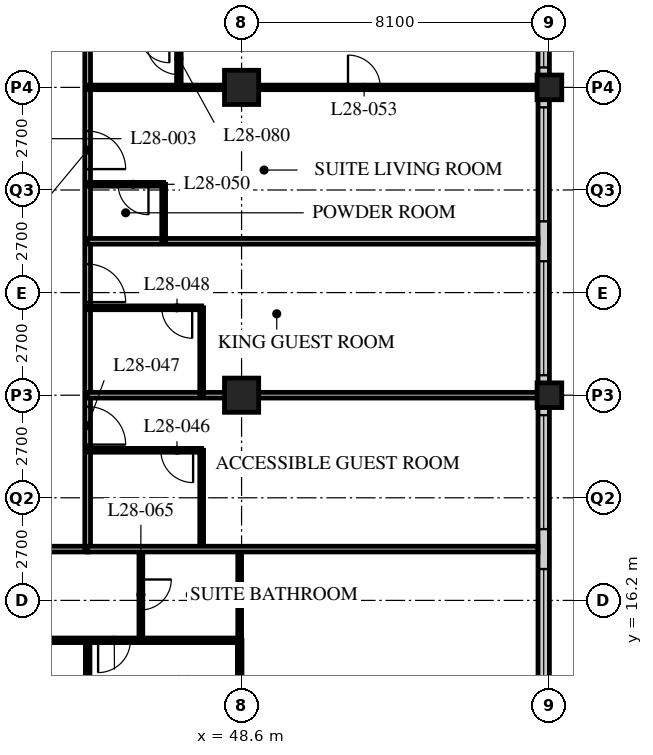
"""IFC4 building model, lengths in metres.
Left out: names, types, materials, properties, quantities, classifications, styles, units other than length and angle.
Written with IfcOpenShell. Run it as: python <this file> out.ifc"""

import sys

from ifc_helpers import new_model, si_unit, direction, frame, frame_2d, origin, origin_2d, place, context, subcontext, project, spatial, rectangle, hollow_rectangle, extrude, element, fill, save


model = new_model("IFC4")
c1 = context("Model", 3, precision=1e-05, world=origin(), true_north=direction((0.0, 1.0)))
c2 = subcontext(c1, "Body", "Model", "MODEL_VIEW")
j1 = project(units=[si_unit("LENGTHUNIT", "METRE"), si_unit("PLANEANGLEUNIT", "RADIAN")], contexts=[c1])
p1 = place(None, origin())
s1 = spatial("IfcSite", under=j1, at=p1, CompositionType="ELEMENT")
p2 = place(p1, origin())
s2 = spatial("IfcBuilding", under=s1, at=p2, CompositionType="ELEMENT")
p3 = place(p2, frame((0.0, 0.0, 113.6)))
s3 = spatial("IfcBuildingStorey", under=s2, at=p3, CompositionType="ELEMENT", Elevation=113.6)
for number, where, z_axis, x_axis in (
    (1, (48.6, 21.6, 0.0), (0.0, 0.0, 1.0), (1.0, 0.0, 0.0)),
    (2, (48.6, 29.7, 0.0), (0.0, 0.0, 1.0), (1.0, 0.0, 0.0)),
):
    element("IfcColumn", number, at=place(p3, frame(where, z_axis=z_axis, x_axis=x_axis)), inside=s3, PredefinedType="COLUMN", context=c2, shape_type="SweptSolid", body=[
        extrude(hollow_rectangle(XDim=0.9, YDim=0.9, WallThickness=0.09, at=origin_2d()), origin(), (0.0, 0.0, 1.0), 3.4),
    ])
for number, where, z_axis, x_axis in (
    (3, (56.7, 21.6, 0.0), (0.0, 0.0, 1.0), (1.0, 0.0, 0.0)),
    (4, (56.7, 29.7, 0.0), (0.0, 0.0, 1.0), (1.0, 0.0, 0.0)),
):
    element("IfcColumn", number, at=place(p3, frame(where, z_axis=z_axis, x_axis=x_axis)), inside=s3, PredefinedType="COLUMN", context=c2, shape_type="SweptSolid", body=[
        extrude(hollow_rectangle(XDim=0.65, YDim=0.65, WallThickness=0.055, at=origin_2d()), origin(), (0.0, 0.0, 1.0), 3.4),
    ])
p4 = place(p3, frame((56.55, 13.8, 0.0), z_axis=(0.0, 0.0, 1.0), x_axis=(0.0, 1.0, 0.0)))
e5 = element("IfcWall", 5, at=p4, inside=s3, PredefinedType="SOLIDWALL", context=c2, shape_type="SweptSolid", body=[
    extrude(rectangle(XDim=32.1, YDim=0.3, at=frame_2d((16.05, 0.0))), origin(), (0.0, 0.0, 1.0), 3.19),
])
p5 = place(p4, frame((0.225, 0.0, 0.9)))
e6 = element("IfcOpeningElement", 6, at=p5, cuts=e5, PredefinedType="OPENING", context=c2, shape_type="SweptSolid", body=[
    extrude(rectangle(XDim=3.0, YDim=2.0, at=frame_2d((1.5, 1.0))), frame((0.0, 0.16, 0.0), z_axis=(0.0, -1.0, 0.0), x_axis=(1.0, 0.0, 0.0)), (0.0, 0.0, 1.0), 0.32),
])
p6 = place(p4, frame((4.275, 0.0, 0.9)))
e7 = element("IfcOpeningElement", 7, at=p6, cuts=e5, PredefinedType="OPENING", context=c2, shape_type="SweptSolid", body=[
    extrude(rectangle(XDim=3.0, YDim=2.0, at=frame_2d((1.5, 1.0))), frame((0.0, 0.16, 0.0), z_axis=(0.0, -1.0, 0.0), x_axis=(1.0, 0.0, 0.0)), (0.0, 0.0, 1.0), 0.32),
])
p7 = place(p4, frame((8.325, 0.0, 0.9)))
e8 = element("IfcOpeningElement", 8, at=p7, cuts=e5, PredefinedType="OPENING", context=c2, shape_type="SweptSolid", body=[
    extrude(rectangle(XDim=3.0, YDim=2.0, at=frame_2d((1.5, 1.0))), frame((0.0, 0.16, 0.0), z_axis=(0.0, -1.0, 0.0), x_axis=(1.0, 0.0, 0.0)), (0.0, 0.0, 1.0), 0.32),
])
p8 = place(p4, frame((12.375, 0.0, 0.9)))
e9 = element("IfcOpeningElement", 9, at=p8, cuts=e5, PredefinedType="OPENING", context=c2, shape_type="SweptSolid", body=[
    extrude(rectangle(XDim=3.0, YDim=2.0, at=frame_2d((1.5, 1.0))), frame((0.0, 0.16, 0.0), z_axis=(0.0, -1.0, 0.0), x_axis=(1.0, 0.0, 0.0)), (0.0, 0.0, 1.0), 0.32),
])
p9 = place(p4, frame((16.425, 0.0, 0.9)))
e10 = element("IfcOpeningElement", 10, at=p9, cuts=e5, PredefinedType="OPENING", context=c2, shape_type="SweptSolid", body=[
    extrude(rectangle(XDim=3.0, YDim=2.0, at=frame_2d((1.5, 1.0))), frame((0.0, 0.16, 0.0), z_axis=(0.0, -1.0, 0.0), x_axis=(1.0, 0.0, 0.0)), (0.0, 0.0, 1.0), 0.32),
])
p10 = place(p4, frame((20.475, 0.0, 0.9)))
e11 = element("IfcOpeningElement", 11, at=p10, cuts=e5, PredefinedType="OPENING", context=c2, shape_type="SweptSolid", body=[
    extrude(rectangle(XDim=3.0, YDim=2.0, at=frame_2d((1.5, 1.0))), frame((0.0, 0.16, 0.0), z_axis=(0.0, -1.0, 0.0), x_axis=(1.0, 0.0, 0.0)), (0.0, 0.0, 1.0), 0.32),
])
p11 = place(p4, frame((24.525, 0.0, 0.9)))
e12 = element("IfcOpeningElement", 12, at=p11, cuts=e5, PredefinedType="OPENING", context=c2, shape_type="SweptSolid", body=[
    extrude(rectangle(XDim=3.0, YDim=2.0, at=frame_2d((1.5, 1.0))), frame((0.0, 0.16, 0.0), z_axis=(0.0, -1.0, 0.0), x_axis=(1.0, 0.0, 0.0)), (0.0, 0.0, 1.0), 0.32),
])
p12 = place(p4, frame((28.575, 0.0, 0.9)))
e13 = element("IfcOpeningElement", 13, at=p12, cuts=e5, PredefinedType="OPENING", context=c2, shape_type="SweptSolid", body=[
    extrude(rectangle(XDim=3.0, YDim=2.0, at=frame_2d((1.5, 1.0))), frame((0.0, 0.16, 0.0), z_axis=(0.0, -1.0, 0.0), x_axis=(1.0, 0.0, 0.0)), (0.0, 0.0, 1.0), 0.32),
])
p13 = place(p3, frame((12.15, 17.55, 0.0), z_axis=(0.0, 0.0, 1.0), x_axis=(1.0, 0.0, 0.0)))
e14 = element("IfcWall", 14, at=p13, inside=s3, PredefinedType="PARTITIONING", context=c2, shape_type="SweptSolid", body=[
    extrude(rectangle(XDim=32.4, YDim=0.15, at=frame_2d((16.2, 0.0))), origin(), (0.0, 0.0, 1.0), 3.19),
])
p14 = place(p13, frame((5.95, 0.0, 0.0)))
e15 = element("IfcOpeningElement", 15, at=p14, cuts=e14, PredefinedType="OPENING", context=c2, shape_type="SweptSolid", body=[
    extrude(rectangle(XDim=1.0, YDim=2.1, at=frame_2d((0.5, 1.05))), frame((0.0, 0.085, 0.0), z_axis=(0.0, -1.0, 0.0), x_axis=(1.0, 0.0, 0.0)), (0.0, 0.0, 1.0), 0.17),
])
p15 = place(p13, frame((17.725, 0.0, 0.0)))
e16 = element("IfcOpeningElement", 16, at=p15, cuts=e14, PredefinedType="OPENING", context=c2, shape_type="SweptSolid", body=[
    extrude(rectangle(XDim=1.0, YDim=2.1, at=frame_2d((0.5, 1.05))), frame((0.0, 0.085, 0.0), z_axis=(0.0, -1.0, 0.0), x_axis=(1.0, 0.0, 0.0)), (0.0, 0.0, 1.0), 0.17),
])
p16 = place(p13, frame((26.75, 0.0, 0.0)))
e17 = element("IfcOpeningElement", 17, at=p16, cuts=e14, PredefinedType="OPENING", context=c2, shape_type="SweptSolid", body=[
    extrude(rectangle(XDim=1.0, YDim=2.1, at=frame_2d((0.5, 1.05))), frame((0.0, 0.085, 0.0), z_axis=(0.0, -1.0, 0.0), x_axis=(1.0, 0.0, 0.0)), (0.0, 0.0, 1.0), 0.17),
])
p17 = place(p13, frame((1.525, 0.0, 0.0)))
e18 = element("IfcOpeningElement", 18, at=p17, cuts=e14, PredefinedType="OPENING", context=c2, shape_type="SweptSolid", body=[
    extrude(rectangle(XDim=1.0, YDim=2.1, at=frame_2d((0.5, 1.05))), frame((0.0, 0.085, 0.0), z_axis=(0.0, -1.0, 0.0), x_axis=(1.0, 0.0, 0.0)), (0.0, 0.0, 1.0), 0.17),
])
p18 = place(p13, frame((29.875, 0.0, 0.0)))
e19 = element("IfcOpeningElement", 19, at=p18, cuts=e14, PredefinedType="OPENING", context=c2, shape_type="SweptSolid", body=[
    extrude(rectangle(XDim=1.0, YDim=2.1, at=frame_2d((0.5, 1.05))), frame((0.0, 0.085, 0.0), z_axis=(0.0, -1.0, 0.0), x_axis=(1.0, 0.0, 0.0)), (0.0, 0.0, 1.0), 0.17),
])
p19 = place(p3, frame((44.55, 17.55, 0.0), z_axis=(0.0, 0.0, 1.0), x_axis=(0.0, 1.0, 0.0)))
e20 = element("IfcWall", 20, at=p19, inside=s3, PredefinedType="PARTITIONING", context=c2, shape_type="SweptSolid", body=[
    extrude(rectangle(XDim=28.35, YDim=0.15, at=frame_2d((14.175, 0.0))), origin(), (0.0, 0.0, 1.0), 3.19),
])
p20 = place(p19, frame((2.75, 0.0, 0.0)))
e21 = element("IfcOpeningElement", 21, at=p20, cuts=e20, PredefinedType="OPENING", context=c2, shape_type="SweptSolid", body=[
    extrude(rectangle(XDim=1.0, YDim=2.1, at=frame_2d((0.5, 1.05))), frame((0.0, 0.085, 0.0), z_axis=(0.0, -1.0, 0.0), x_axis=(1.0, 0.0, 0.0)), (0.0, 0.0, 1.0), 0.17),
])
p21 = place(p19, frame((6.5, 0.0, 0.0)))
e22 = element("IfcOpeningElement", 22, at=p21, cuts=e20, PredefinedType="OPENING", context=c2, shape_type="SweptSolid", body=[
    extrude(rectangle(XDim=1.0, YDim=2.1, at=frame_2d((0.5, 1.05))), frame((0.0, 0.085, 0.0), z_axis=(0.0, -1.0, 0.0), x_axis=(1.0, 0.0, 0.0)), (0.0, 0.0, 1.0), 0.17),
])
p22 = place(p19, frame((10.0, 0.0, 0.0)))
e23 = element("IfcOpeningElement", 23, at=p22, cuts=e20, PredefinedType="OPENING", context=c2, shape_type="SweptSolid", body=[
    extrude(rectangle(XDim=1.0, YDim=2.1, at=frame_2d((0.5, 1.05))), frame((0.0, 0.085, 0.0), z_axis=(0.0, -1.0, 0.0), x_axis=(1.0, 0.0, 0.0)), (0.0, 0.0, 1.0), 0.17),
])
p23 = place(p19, frame((21.65, 0.0, 0.0)))
e24 = element("IfcOpeningElement", 24, at=p23, cuts=e20, PredefinedType="OPENING", context=c2, shape_type="SweptSolid", body=[
    extrude(rectangle(XDim=1.0, YDim=2.1, at=frame_2d((0.5, 1.05))), frame((0.0, 0.085, 0.0), z_axis=(0.0, -1.0, 0.0), x_axis=(1.0, 0.0, 0.0)), (0.0, 0.0, 1.0), 0.17),
])
p24 = place(p19, frame((26.75, 0.0, 0.0)))
e25 = element("IfcOpeningElement", 25, at=p24, cuts=e20, PredefinedType="OPENING", context=c2, shape_type="SweptSolid", body=[
    extrude(rectangle(XDim=1.0, YDim=2.1, at=frame_2d((0.5, 1.05))), frame((0.0, 0.085, 0.0), z_axis=(0.0, -1.0, 0.0), x_axis=(1.0, 0.0, 0.0)), (0.0, 0.0, 1.0), 0.17),
])
p25 = place(p3, frame((47.55, 17.55, 0.0), z_axis=(0.0, 0.0, 1.0), x_axis=(0.0, 1.0, 0.0)))
e26 = element("IfcWall", 26, at=p25, inside=s3, PredefinedType="PARTITIONING", context=c2, shape_type="SweptSolid", body=[
    extrude(rectangle(XDim=2.6, YDim=0.1, at=frame_2d((1.3, 0.0))), origin(), (0.0, 0.0, 1.0), 3.19),
])
p26 = place(p3, frame((44.55, 20.15, 0.0), z_axis=(0.0, 0.0, 1.0), x_axis=(1.0, 0.0, 0.0)))
e27 = element("IfcWall", 27, at=p26, inside=s3, PredefinedType="PARTITIONING", context=c2, shape_type="SweptSolid", body=[
    extrude(rectangle(XDim=3.0, YDim=0.1, at=frame_2d((1.5, 0.0))), origin(), (0.0, 0.0, 1.0), 3.19),
])
p27 = place(p26, frame((1.925, 0.0, 0.0)))
e28 = element("IfcOpeningElement", 28, at=p27, cuts=e27, PredefinedType="OPENING", context=c2, shape_type="SweptSolid", body=[
    extrude(rectangle(XDim=0.85, YDim=2.1, at=frame_2d((0.425, 1.05))), frame((0.0, 0.06, 0.0), z_axis=(0.0, -1.0, 0.0), x_axis=(1.0, 0.0, 0.0)), (0.0, 0.0, 1.0), 0.12),
])
p28 = place(p3, frame((44.55, 21.6, 0.0), z_axis=(0.0, 0.0, 1.0), x_axis=(1.0, 0.0, 0.0)))
e29 = element("IfcWall", 29, at=p28, inside=s3, PredefinedType="PARTITIONING", context=c2, shape_type="SweptSolid", body=[
    extrude(rectangle(XDim=11.85, YDim=0.15, at=frame_2d((5.925, 0.0))), origin(), (0.0, 0.0, 1.0), 2.578),
])
p29 = place(p3, frame((47.55, 21.6, 0.0), z_axis=(0.0, 0.0, 1.0), x_axis=(0.0, 1.0, 0.0)))
e30 = element("IfcWall", 30, at=p29, inside=s3, PredefinedType="PARTITIONING", context=c2, shape_type="SweptSolid", body=[
    extrude(rectangle(XDim=2.3, YDim=0.1, at=frame_2d((1.15, 0.0))), origin(), (0.0, 0.0, 1.0), 3.19),
])
p30 = place(p3, frame((44.55, 23.9, 0.0), z_axis=(0.0, 0.0, 1.0), x_axis=(1.0, 0.0, 0.0)))
e31 = element("IfcWall", 31, at=p30, inside=s3, PredefinedType="PARTITIONING", context=c2, shape_type="SweptSolid", body=[
    extrude(rectangle(XDim=3.0, YDim=0.1, at=frame_2d((1.5, 0.0))), origin(), (0.0, 0.0, 1.0), 3.19),
])
p31 = place(p30, frame((1.95, 0.0, 0.0)))
e32 = element("IfcOpeningElement", 32, at=p31, cuts=e31, PredefinedType="OPENING", context=c2, shape_type="SweptSolid", body=[
    extrude(rectangle(XDim=0.8, YDim=2.1, at=frame_2d((0.4, 1.05))), frame((0.0, 0.06, 0.0), z_axis=(0.0, -1.0, 0.0), x_axis=(1.0, 0.0, 0.0)), (0.0, 0.0, 1.0), 0.12),
])
p32 = place(p3, frame((44.55, 25.65, 0.0), z_axis=(0.0, 0.0, 1.0), x_axis=(1.0, 0.0, 0.0)))
e33 = element("IfcWall", 33, at=p32, inside=s3, PredefinedType="PARTITIONING", context=c2, shape_type="SweptSolid", body=[
    extrude(rectangle(XDim=11.85, YDim=0.15, at=frame_2d((5.925, 0.0))), origin(), (0.0, 0.0, 1.0), 3.19),
])
p33 = place(p3, frame((46.55, 25.65, 0.0), z_axis=(0.0, 0.0, 1.0), x_axis=(0.0, 1.0, 0.0)))
e34 = element("IfcWall", 34, at=p33, inside=s3, PredefinedType="PARTITIONING", context=c2, shape_type="SweptSolid", body=[
    extrude(rectangle(XDim=1.5, YDim=0.1, at=frame_2d((0.75, 0.0))), origin(), (0.0, 0.0, 1.0), 3.19),
])
p34 = place(p3, frame((44.55, 27.15, 0.0), z_axis=(0.0, 0.0, 1.0), x_axis=(1.0, 0.0, 0.0)))
e35 = element("IfcWall", 35, at=p34, inside=s3, PredefinedType="PARTITIONING", context=c2, shape_type="SweptSolid", body=[
    extrude(rectangle(XDim=2.0, YDim=0.1, at=frame_2d((1.0, 0.0))), origin(), (0.0, 0.0, 1.0), 3.19),
])
p35 = place(p34, frame((0.8, 0.0, 0.0)))
e36 = element("IfcOpeningElement", 36, at=p35, cuts=e35, PredefinedType="OPENING", context=c2, shape_type="SweptSolid", body=[
    extrude(rectangle(XDim=0.8, YDim=2.1, at=frame_2d((0.4, 1.05))), frame((0.0, 0.06, 0.0), z_axis=(0.0, -1.0, 0.0), x_axis=(1.0, 0.0, 0.0)), (0.0, 0.0, 1.0), 0.12),
])
p36 = place(p3, frame((44.55, 29.7, 0.0), z_axis=(0.0, 0.0, 1.0), x_axis=(1.0, 0.0, 0.0)))
e37 = element("IfcWall", 37, at=p36, inside=s3, PredefinedType="PARTITIONING", context=c2, shape_type="SweptSolid", body=[
    extrude(rectangle(XDim=11.85, YDim=0.12, at=frame_2d((5.925, 0.0))), origin(), (0.0, 0.0, 1.0), 2.578),
])
p37 = place(p36, frame((6.85, 0.0, 0.0)))
e38 = element("IfcOpeningElement", 38, at=p37, cuts=e37, PredefinedType="OPENING", context=c2, shape_type="SweptSolid", body=[
    extrude(rectangle(XDim=0.85, YDim=2.1, at=frame_2d((0.425, 1.05))), frame((0.0, 0.07, 0.0), z_axis=(0.0, -1.0, 0.0), x_axis=(1.0, 0.0, 0.0)), (0.0, 0.0, 1.0), 0.14),
])
p38 = place(p3, frame((40.5, 15.15, 0.0), z_axis=(0.0, 0.0, 1.0), x_axis=(1.0, 0.0, 0.0)))
e39 = element("IfcWall", 39, at=p38, inside=s3, PredefinedType="PARTITIONING", context=c2, shape_type="SweptSolid", body=[
    extrude(rectangle(XDim=8.05, YDim=0.12, at=frame_2d((4.025, 0.0))), origin(), (0.0, 0.0, 1.0), 3.19),
])
p39 = place(p38, frame((0.475, 0.0, 0.0)))
e40 = element("IfcOpeningElement", 40, at=p39, cuts=e39, PredefinedType="OPENING", context=c2, shape_type="SweptSolid", body=[
    extrude(rectangle(XDim=0.85, YDim=2.1, at=frame_2d((0.425, 1.05))), frame((0.0, 0.07, 0.0), z_axis=(0.0, -1.0, 0.0), x_axis=(1.0, 0.0, 0.0)), (0.0, 0.0, 1.0), 0.14),
])
p40 = place(p38, frame((4.325, 0.0, 0.0)))
e41 = element("IfcOpeningElement", 41, at=p40, cuts=e39, PredefinedType="OPENING", context=c2, shape_type="SweptSolid", body=[
    extrude(rectangle(XDim=0.85, YDim=2.1, at=frame_2d((0.425, 1.05))), frame((0.0, 0.07, 0.0), z_axis=(0.0, -1.0, 0.0), x_axis=(1.0, 0.0, 0.0)), (0.0, 0.0, 1.0), 0.14),
])
p41 = place(p3, frame((45.95, 17.55, 0.0), z_axis=(0.0, 0.0, 1.0), x_axis=(0.0, -1.0, 0.0)))
e42 = element("IfcWall", 42, at=p41, inside=s3, PredefinedType="PARTITIONING", context=c2, shape_type="SweptSolid", body=[
    extrude(rectangle(XDim=2.4, YDim=0.1, at=frame_2d((1.2, 0.0))), origin(), (0.0, 0.0, 1.0), 3.19),
])
p42 = place(p41, frame((0.8, 0.0, 0.0)))
e43 = element("IfcOpeningElement", 43, at=p42, cuts=e42, PredefinedType="OPENING", context=c2, shape_type="SweptSolid", body=[
    extrude(rectangle(XDim=0.8, YDim=2.1, at=frame_2d((0.4, 1.05))), frame((0.0, 0.06, 0.0), z_axis=(0.0, -1.0, 0.0), x_axis=(1.0, 0.0, 0.0)), (0.0, 0.0, 1.0), 0.12),
])
p43 = place(p3, frame((48.55, 17.55, 0.0), z_axis=(0.0, 0.0, 1.0), x_axis=(0.0, -1.0, 0.0)))
e44 = element("IfcWall", 44, at=p43, inside=s3, PredefinedType="PARTITIONING", context=c2, shape_type="SweptSolid", body=[
    extrude(rectangle(XDim=2.4, YDim=0.1, at=frame_2d((1.2, 0.0))), origin(), (0.0, 0.0, 1.0), 2.578),
])
p44 = place(p3, frame((44.55, 15.15, 0.0), z_axis=(0.0, 0.0, 1.0), x_axis=(0.0, -1.0, 0.0)))
e45 = element("IfcWall", 45, at=p44, inside=s3, PredefinedType="PARTITIONING", context=c2, shape_type="SweptSolid", body=[
    extrude(rectangle(XDim=9.45, YDim=0.12, at=frame_2d((4.725, 0.0))), origin(), (0.0, 0.0, 1.0), 3.19),
])
p45 = place(p3, frame((44.55, 17.55, 0.0), z_axis=(0.0, 0.0, 1.0), x_axis=(1.0, 0.0, 0.0)))
e46 = element("IfcWall", 46, at=p45, inside=s3, PredefinedType="PARTITIONING", context=c2, shape_type="SweptSolid", body=[
    extrude(rectangle(XDim=11.85, YDim=0.15, at=frame_2d((5.925, 0.0))), origin(), (0.0, 0.0, 1.0), 3.19),
])
p46 = place(p3, frame((46.95, 31.16, 0.0), z_axis=(0.0, 0.0, 1.0), x_axis=(0.0, -1.0, 0.0)))
e47 = element("IfcWall", 47, at=p46, inside=s3, PredefinedType="PARTITIONING", context=c2, shape_type="SweptSolid", body=[
    extrude(rectangle(XDim=1.46, YDim=0.12, at=frame_2d((0.73, 0.0))), origin(), (0.0, 0.0, 1.0), 3.19),
])
p47 = place(p46, frame((0.275, 0.0, 0.0)))
e48 = element("IfcOpeningElement", 48, at=p47, cuts=e47, PredefinedType="OPENING", context=c2, shape_type="SweptSolid", body=[
    extrude(rectangle(XDim=0.85, YDim=2.1, at=frame_2d((0.425, 1.05))), frame((0.0, 0.07, 0.0), z_axis=(0.0, -1.0, 0.0), x_axis=(1.0, 0.0, 0.0)), (0.0, 0.0, 1.0), 0.14),
])
p48 = place(p3, frame((48.55, 15.15, 0.0), z_axis=(0.0, 0.0, 1.0), x_axis=(0.0, -1.0, 0.0)))
e49 = element("IfcWall", 49, at=p48, inside=s3, PredefinedType="PARTITIONING", context=c2, shape_type="SweptSolid", body=[
    extrude(rectangle(XDim=1.2, YDim=0.12, at=frame_2d((0.6, 0.0))), origin(), (0.0, 0.0, 1.0), 2.578),
])
p49 = place(p5, origin())
e50 = element("IfcWindow", 50, at=p49, inside=s3, PartitioningType="SINGLE_PANEL", PredefinedType="WINDOW", context=c2, shape_type="SweptSolid", body=[
    extrude(rectangle(XDim=3.0, YDim=2.0, at=frame_2d((1.5, 1.0))), frame((0.0, 0.03, 0.0), z_axis=(0.0, -1.0, 0.0), x_axis=(1.0, 0.0, 0.0)), (0.0, 0.0, 1.0), 0.06),
])
fill(e6, e50)
p50 = place(p6, origin())
e51 = element("IfcWindow", 51, at=p50, inside=s3, PartitioningType="SINGLE_PANEL", PredefinedType="WINDOW", context=c2, shape_type="SweptSolid", body=[
    extrude(rectangle(XDim=3.0, YDim=2.0, at=frame_2d((1.5, 1.0))), frame((0.0, 0.03, 0.0), z_axis=(0.0, -1.0, 0.0), x_axis=(1.0, 0.0, 0.0)), (0.0, 0.0, 1.0), 0.06),
])
fill(e7, e51)
p51 = place(p7, origin())
e52 = element("IfcWindow", 52, at=p51, inside=s3, PartitioningType="SINGLE_PANEL", PredefinedType="WINDOW", context=c2, shape_type="SweptSolid", body=[
    extrude(rectangle(XDim=3.0, YDim=2.0, at=frame_2d((1.5, 1.0))), frame((0.0, 0.03, 0.0), z_axis=(0.0, -1.0, 0.0), x_axis=(1.0, 0.0, 0.0)), (0.0, 0.0, 1.0), 0.06),
])
fill(e8, e52)
p52 = place(p8, origin())
e53 = element("IfcWindow", 53, at=p52, inside=s3, PartitioningType="SINGLE_PANEL", PredefinedType="WINDOW", context=c2, shape_type="SweptSolid", body=[
    extrude(rectangle(XDim=3.0, YDim=2.0, at=frame_2d((1.5, 1.0))), frame((0.0, 0.03, 0.0), z_axis=(0.0, -1.0, 0.0), x_axis=(1.0, 0.0, 0.0)), (0.0, 0.0, 1.0), 0.06),
])
fill(e9, e53)
p53 = place(p9, origin())
e54 = element("IfcWindow", 54, at=p53, inside=s3, PartitioningType="SINGLE_PANEL", PredefinedType="WINDOW", context=c2, shape_type="SweptSolid", body=[
    extrude(rectangle(XDim=3.0, YDim=2.0, at=frame_2d((1.5, 1.0))), frame((0.0, 0.03, 0.0), z_axis=(0.0, -1.0, 0.0), x_axis=(1.0, 0.0, 0.0)), (0.0, 0.0, 1.0), 0.06),
])
fill(e10, e54)
p54 = place(p27, origin())
e55 = element("IfcDoor", 55, at=p54, inside=s3, OperationType="SINGLE_SWING_LEFT", PredefinedType="DOOR", context=c2, shape_type="SweptSolid", body=[
    extrude(rectangle(XDim=0.85, YDim=2.1, at=frame_2d((0.425, 1.05))), frame((0.0, 0.025, 0.0), z_axis=(0.0, -1.0, 0.0), x_axis=(1.0, 0.0, 0.0)), (0.0, 0.0, 1.0), 0.05),
])
fill(e28, e55)
p55 = place(p20, origin())
e56 = element("IfcDoor", 56, at=p55, inside=s3, OperationType="SINGLE_SWING_RIGHT", PredefinedType="DOOR", context=c2, shape_type="SweptSolid", body=[
    extrude(rectangle(XDim=1.0, YDim=2.1, at=frame_2d((0.5, 1.05))), frame((0.0, 0.025, 0.0), z_axis=(0.0, -1.0, 0.0), x_axis=(1.0, 0.0, 0.0)), (0.0, 0.0, 1.0), 0.05),
])
fill(e21, e56)
p56 = place(p31, origin())
e57 = element("IfcDoor", 57, at=p56, inside=s3, OperationType="SINGLE_SWING_LEFT", PredefinedType="DOOR", context=c2, shape_type="SweptSolid", body=[
    extrude(rectangle(XDim=0.8, YDim=2.1, at=frame_2d((0.4, 1.05))), frame((0.0, 0.025, 0.0), z_axis=(0.0, -1.0, 0.0), x_axis=(1.0, 0.0, 0.0)), (0.0, 0.0, 1.0), 0.05),
])
fill(e32, e57)
p57 = place(p21, origin())
e58 = element("IfcDoor", 58, at=p57, inside=s3, OperationType="SINGLE_SWING_RIGHT", PredefinedType="DOOR", context=c2, shape_type="SweptSolid", body=[
    extrude(rectangle(XDim=1.0, YDim=2.1, at=frame_2d((0.5, 1.05))), frame((0.0, 0.025, 0.0), z_axis=(0.0, -1.0, 0.0), x_axis=(1.0, 0.0, 0.0)), (0.0, 0.0, 1.0), 0.05),
])
fill(e22, e58)
p58 = place(p35, origin())
e59 = element("IfcDoor", 59, at=p58, inside=s3, OperationType="SINGLE_SWING_LEFT", PredefinedType="DOOR", context=c2, shape_type="SweptSolid", body=[
    extrude(rectangle(XDim=0.8, YDim=2.1, at=frame_2d((0.4, 1.05))), frame((0.0, 0.025, 0.0), z_axis=(0.0, -1.0, 0.0), x_axis=(1.0, 0.0, 0.0)), (0.0, 0.0, 1.0), 0.05),
])
fill(e36, e59)
p59 = place(p22, origin())
e60 = element("IfcDoor", 60, at=p59, inside=s3, OperationType="SINGLE_SWING_RIGHT", PredefinedType="DOOR", context=c2, shape_type="SweptSolid", body=[
    extrude(rectangle(XDim=1.0, YDim=2.1, at=frame_2d((0.5, 1.05))), frame((0.0, 0.025, 0.0), z_axis=(0.0, -1.0, 0.0), x_axis=(1.0, 0.0, 0.0)), (0.0, 0.0, 1.0), 0.05),
])
fill(e23, e60)
p60 = place(p37, origin())
e61 = element("IfcDoor", 61, at=p60, inside=s3, OperationType="SINGLE_SWING_LEFT", PredefinedType="DOOR", context=c2, shape_type="SweptSolid", body=[
    extrude(rectangle(XDim=0.85, YDim=2.1, at=frame_2d((0.425, 1.05))), frame((0.0, 0.025, 0.0), z_axis=(0.0, -1.0, 0.0), x_axis=(1.0, 0.0, 0.0)), (0.0, 0.0, 1.0), 0.05),
])
fill(e38, e61)
p61 = place(p42, origin())
e62 = element("IfcDoor", 62, at=p61, inside=s3, OperationType="SINGLE_SWING_LEFT", PredefinedType="DOOR", context=c2, shape_type="SweptSolid", body=[
    extrude(rectangle(XDim=0.8, YDim=2.1, at=frame_2d((0.4, 1.05))), frame((0.0, 0.025, 0.0), z_axis=(0.0, -1.0, 0.0), x_axis=(1.0, 0.0, 0.0)), (0.0, 0.0, 1.0), 0.05),
])
fill(e43, e62)
p62 = place(p40, origin())
e63 = element("IfcDoor", 63, at=p62, inside=s3, OperationType="SINGLE_SWING_RIGHT", PredefinedType="DOOR", context=c2, shape_type="SweptSolid", body=[
    extrude(rectangle(XDim=0.85, YDim=2.1, at=frame_2d((0.425, 1.05))), frame((0.0, 0.025, 0.0), z_axis=(0.0, -1.0, 0.0), x_axis=(1.0, 0.0, 0.0)), (0.0, 0.0, 1.0), 0.05),
])
fill(e41, e63)
p63 = place(p47, origin())
e64 = element("IfcDoor", 64, at=p63, inside=s3, OperationType="SINGLE_SWING_RIGHT", PredefinedType="DOOR", context=c2, shape_type="SweptSolid", body=[
    extrude(rectangle(XDim=0.85, YDim=2.1, at=frame_2d((0.425, 1.05))), frame((0.0, 0.025, 0.0), z_axis=(0.0, -1.0, 0.0), x_axis=(1.0, 0.0, 0.0)), (0.0, 0.0, 1.0), 0.05),
])
fill(e48, e64)
save(model, sys.argv[1])
